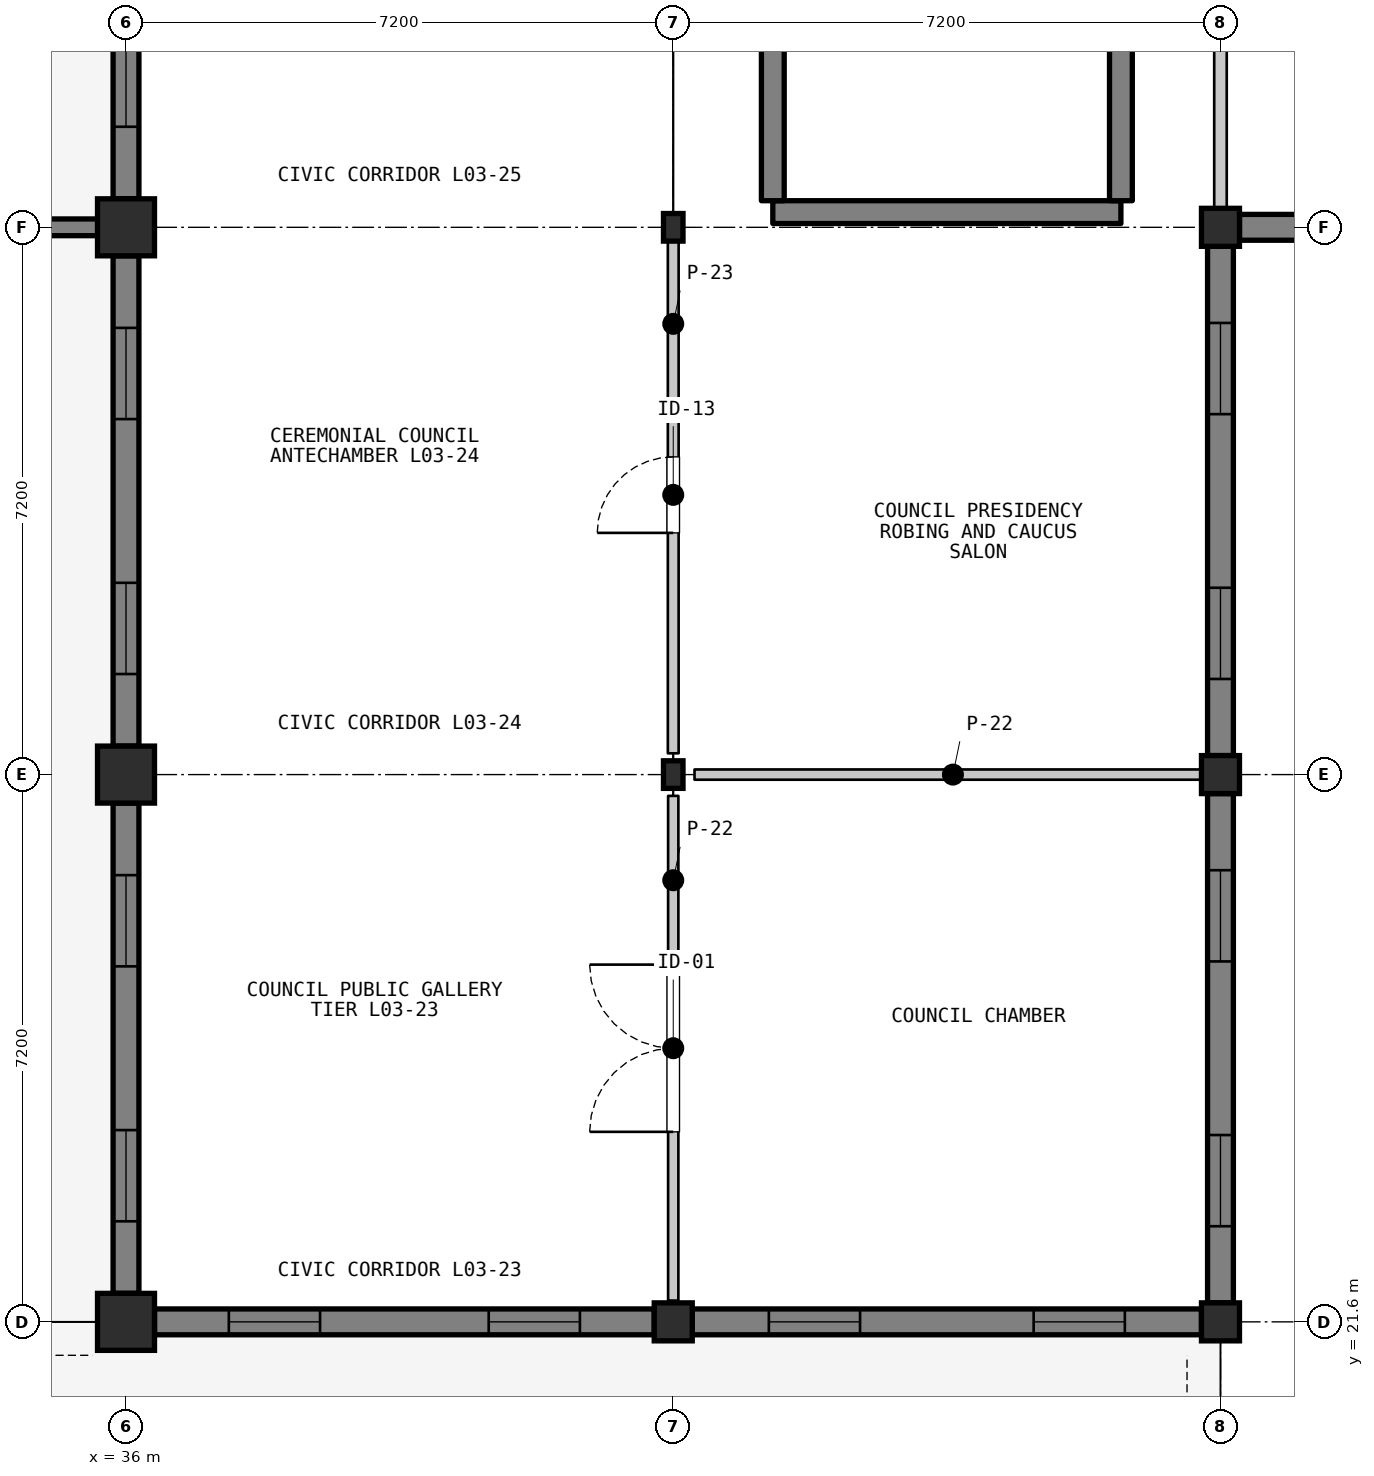
"""IFC4 building model, lengths in metres.
Left out: names, types, materials, properties, quantities, classifications, styles, units other than length and angle.
Written with IfcOpenShell. Run it as: python <this file> out.ifc"""

import sys

from ifc_helpers import new_model, si_unit, direction, frame, frame_2d, origin, origin_2d, place, context, subcontext, project, spatial, rectangle, i_section, extrude, element, fill, save


model = new_model("IFC4")
c1 = context("Model", 3, precision=1e-05, world=origin(), true_north=direction((0.0, 1.0)))
c2 = subcontext(c1, "Body", "Model", "MODEL_VIEW")
j1 = project(units=[si_unit("LENGTHUNIT", "METRE"), si_unit("PLANEANGLEUNIT", "RADIAN")], contexts=[c1])
p1 = place(None, origin())
s1 = spatial("IfcSite", under=j1, at=p1, CompositionType="ELEMENT")
p2 = place(p1, origin())
s2 = spatial("IfcBuilding", under=s1, at=p2, CompositionType="ELEMENT")
p3 = place(p2, frame((0.0, 0.0, 9.9)))
s3 = spatial("IfcBuildingStorey", under=s2, at=p3, CompositionType="ELEMENT", Elevation=9.9)
for number, where, z_axis, x_axis in (
    (1, (36.0, 21.6, 0.0), (0.0, 0.0, 1.0), (1.0, 0.0, 0.0)),
    (2, (36.0, 28.8, 0.0), (0.0, 0.0, 1.0), (1.0, 0.0, 0.0)),
    (3, (36.0, 36.0, 0.0), (0.0, 0.0, 1.0), (1.0, 0.0, 0.0)),
):
    element("IfcColumn", number, at=place(p3, frame(where, z_axis=z_axis, x_axis=x_axis)), inside=s3, PredefinedType="COLUMN", context=c2, shape_type="SweptSolid", body=[
        extrude(rectangle(XDim=0.75, YDim=0.75, at=origin_2d()), origin(), (0.0, 0.0, 1.0), 4.2),
    ])
p4 = place(p3, frame((43.2, 21.6, 0.0), z_axis=(0.0, 0.0, 1.0), x_axis=(1.0, 0.0, 0.0)))
e4 = element("IfcColumn", 4, at=p4, inside=s3, PredefinedType="COLUMN", context=c2, shape_type="SweptSolid", body=[
    extrude(rectangle(XDim=0.5, YDim=0.5, at=origin_2d()), origin(), (0.0, 0.0, 1.0), 4.2),
])
for number, where, z_axis, x_axis in (
    (5, (43.2, 28.8, 0.0), (0.0, 0.0, 1.0), (1.0, 0.0, 0.0)),
    (6, (43.2, 36.0, 0.0), (0.0, 0.0, 1.0), (1.0, 0.0, 0.0)),
):
    element("IfcColumn", number, at=place(p3, frame(where, z_axis=z_axis, x_axis=x_axis)), inside=s3, PredefinedType="COLUMN", context=c2, shape_type="SweptSolid", body=[
        extrude(i_section(OverallWidth=0.257, OverallDepth=0.363, WebThickness=0.013, FlangeThickness=0.022, FilletRadius=0.015, at=origin_2d()), origin(), (0.0, 0.0, 1.0), 4.2),
    ])
for number, where, z_axis, x_axis in (
    (7, (50.4, 21.6, 0.0), (0.0, 0.0, 1.0), (1.0, 0.0, 0.0)),
    (8, (50.4, 28.8, 0.0), (0.0, 0.0, 1.0), (1.0, 0.0, 0.0)),
    (9, (50.4, 36.0, 0.0), (0.0, 0.0, 1.0), (1.0, 0.0, 0.0)),
):
    element("IfcColumn", number, at=place(p3, frame(where, z_axis=z_axis, x_axis=x_axis)), inside=s3, PredefinedType="COLUMN", context=c2, shape_type="SweptSolid", body=[
        extrude(rectangle(XDim=0.5, YDim=0.5, at=origin_2d()), origin(), (0.0, 0.0, 1.0), 4.2),
    ])
p5 = place(p3, frame((42.95, 21.6, 0.0), z_axis=(0.0, 0.0, 1.0), x_axis=(-1.0, 0.0, 0.0)))
e10 = element("IfcWall", 10, at=p5, inside=s3, PredefinedType="SOLIDWALL", context=c2, shape_type="SweptSolid", body=[
    extrude(rectangle(XDim=6.575, YDim=0.34, at=frame_2d((3.288, 0.0))), origin(), (0.0, 0.0, 1.0), 3.398),
])
p6 = place(p5, frame((0.978, 0.0, 0.95)))
e11 = element("IfcOpeningElement", 11, at=p6, cuts=e10, PredefinedType="OPENING", context=c2, shape_type="SweptSolid", body=[
    extrude(rectangle(XDim=1.2, YDim=1.7, at=frame_2d((0.6, 0.85))), frame((0.0, 0.18, 0.0), z_axis=(0.0, -1.0, 0.0), x_axis=(1.0, 0.0, 0.0)), (0.0, 0.0, 1.0), 0.36),
])
p7 = place(p5, frame((4.397, 0.0, 0.95)))
e12 = element("IfcOpeningElement", 12, at=p7, cuts=e10, PredefinedType="OPENING", context=c2, shape_type="SweptSolid", body=[
    extrude(rectangle(XDim=1.2, YDim=1.7, at=frame_2d((0.6, 0.85))), frame((0.0, 0.18, 0.0), z_axis=(0.0, -1.0, 0.0), x_axis=(1.0, 0.0, 0.0)), (0.0, 0.0, 1.0), 0.36),
])
p8 = place(p3, frame((36.0, 21.975, 0.0), z_axis=(0.0, 0.0, 1.0), x_axis=(0.0, 1.0, 0.0)))
e13 = element("IfcWall", 13, at=p8, inside=s3, PredefinedType="SOLIDWALL", context=c2, shape_type="SweptSolid", body=[
    extrude(rectangle(XDim=6.45, YDim=0.34, at=frame_2d((3.225, 0.0))), origin(), (0.0, 0.0, 1.0), 3.35),
])
p9 = place(p8, frame((0.948, 0.0, 0.95)))
e14 = element("IfcOpeningElement", 14, at=p9, cuts=e13, PredefinedType="OPENING", context=c2, shape_type="SweptSolid", body=[
    extrude(rectangle(XDim=1.2, YDim=1.7, at=frame_2d((0.6, 0.85))), frame((0.0, 0.18, 0.0), z_axis=(0.0, -1.0, 0.0), x_axis=(1.0, 0.0, 0.0)), (0.0, 0.0, 1.0), 0.36),
])
p10 = place(p8, frame((4.302, 0.0, 0.95)))
e15 = element("IfcOpeningElement", 15, at=p10, cuts=e13, PredefinedType="OPENING", context=c2, shape_type="SweptSolid", body=[
    extrude(rectangle(XDim=1.2, YDim=1.7, at=frame_2d((0.6, 0.85))), frame((0.0, 0.18, 0.0), z_axis=(0.0, -1.0, 0.0), x_axis=(1.0, 0.0, 0.0)), (0.0, 0.0, 1.0), 0.36),
])
p11 = place(p3, frame((36.0, 29.175, 0.0), z_axis=(0.0, 0.0, 1.0), x_axis=(0.0, 1.0, 0.0)))
e16 = element("IfcWall", 16, at=p11, inside=s3, PredefinedType="SOLIDWALL", context=c2, shape_type="SweptSolid", body=[
    extrude(rectangle(XDim=6.45, YDim=0.34, at=frame_2d((3.225, 0.0))), origin(), (0.0, 0.0, 1.0), 3.35),
])
p12 = place(p11, frame((0.948, 0.0, 0.95)))
e17 = element("IfcOpeningElement", 17, at=p12, cuts=e16, PredefinedType="OPENING", context=c2, shape_type="SweptSolid", body=[
    extrude(rectangle(XDim=1.2, YDim=1.7, at=frame_2d((0.6, 0.85))), frame((0.0, 0.18, 0.0), z_axis=(0.0, -1.0, 0.0), x_axis=(1.0, 0.0, 0.0)), (0.0, 0.0, 1.0), 0.36),
])
p13 = place(p11, frame((4.302, 0.0, 0.95)))
e18 = element("IfcOpeningElement", 18, at=p13, cuts=e16, PredefinedType="OPENING", context=c2, shape_type="SweptSolid", body=[
    extrude(rectangle(XDim=1.2, YDim=1.7, at=frame_2d((0.6, 0.85))), frame((0.0, 0.18, 0.0), z_axis=(0.0, -1.0, 0.0), x_axis=(1.0, 0.0, 0.0)), (0.0, 0.0, 1.0), 0.36),
])
p14 = place(p3, frame((36.0, 36.375, 0.0), z_axis=(0.0, 0.0, 1.0), x_axis=(0.0, 1.0, 0.0)))
e19 = element("IfcWall", 19, at=p14, inside=s3, PredefinedType="SOLIDWALL", context=c2, shape_type="SweptSolid", body=[
    extrude(rectangle(XDim=6.45, YDim=0.34, at=frame_2d((3.225, 0.0))), origin(), (0.0, 0.0, 1.0), 3.35),
])
p15 = place(p14, frame((0.948, 0.0, 0.95)))
e20 = element("IfcOpeningElement", 20, at=p15, cuts=e19, PredefinedType="OPENING", context=c2, shape_type="SweptSolid", body=[
    extrude(rectangle(XDim=1.2, YDim=1.7, at=frame_2d((0.6, 0.85))), frame((0.0, 0.18, 0.0), z_axis=(0.0, -1.0, 0.0), x_axis=(1.0, 0.0, 0.0)), (0.0, 0.0, 1.0), 0.36),
])
p16 = place(p14, frame((4.302, 0.0, 0.95)))
e21 = element("IfcOpeningElement", 21, at=p16, cuts=e19, PredefinedType="OPENING", context=c2, shape_type="SweptSolid", body=[
    extrude(rectangle(XDim=1.2, YDim=1.7, at=frame_2d((0.6, 0.85))), frame((0.0, 0.18, 0.0), z_axis=(0.0, -1.0, 0.0), x_axis=(1.0, 0.0, 0.0)), (0.0, 0.0, 1.0), 0.36),
])
p17 = place(p3, frame((50.15, 21.6, 0.0), z_axis=(0.0, 0.0, 1.0), x_axis=(-1.0, 0.0, 0.0)))
e22 = element("IfcWall", 22, at=p17, inside=s3, PredefinedType="SOLIDWALL", context=c2, shape_type="SweptSolid", body=[
    extrude(rectangle(XDim=6.7, YDim=0.34, at=frame_2d((3.35, 0.0))), origin(), (0.0, 0.0, 1.0), 3.398),
])
p18 = place(p17, frame((1.008, 0.0, 0.95)))
e23 = element("IfcOpeningElement", 23, at=p18, cuts=e22, PredefinedType="OPENING", context=c2, shape_type="SweptSolid", body=[
    extrude(rectangle(XDim=1.2, YDim=1.7, at=frame_2d((0.6, 0.85))), frame((0.0, 0.18, 0.0), z_axis=(0.0, -1.0, 0.0), x_axis=(1.0, 0.0, 0.0)), (0.0, 0.0, 1.0), 0.36),
])
p19 = place(p17, frame((4.492, 0.0, 0.95)))
e24 = element("IfcOpeningElement", 24, at=p19, cuts=e22, PredefinedType="OPENING", context=c2, shape_type="SweptSolid", body=[
    extrude(rectangle(XDim=1.2, YDim=1.7, at=frame_2d((0.6, 0.85))), frame((0.0, 0.18, 0.0), z_axis=(0.0, -1.0, 0.0), x_axis=(1.0, 0.0, 0.0)), (0.0, 0.0, 1.0), 0.36),
])
p20 = place(p3, frame((50.4, 28.55, 0.0), z_axis=(0.0, 0.0, 1.0), x_axis=(0.0, -1.0, 0.0)))
e25 = element("IfcWall", 25, at=p20, inside=s3, PredefinedType="SOLIDWALL", context=c2, shape_type="SweptSolid", body=[
    extrude(rectangle(XDim=6.7, YDim=0.34, at=frame_2d((3.35, 0.0))), origin(), (0.0, 0.0, 1.0), 3.467),
])
p21 = place(p20, frame((1.008, 0.0, 0.95)))
e26 = element("IfcOpeningElement", 26, at=p21, cuts=e25, PredefinedType="OPENING", context=c2, shape_type="SweptSolid", body=[
    extrude(rectangle(XDim=1.2, YDim=1.7, at=frame_2d((0.6, 0.85))), frame((0.0, 0.18, 0.0), z_axis=(0.0, -1.0, 0.0), x_axis=(1.0, 0.0, 0.0)), (0.0, 0.0, 1.0), 0.36),
])
p22 = place(p20, frame((4.492, 0.0, 0.95)))
e27 = element("IfcOpeningElement", 27, at=p22, cuts=e25, PredefinedType="OPENING", context=c2, shape_type="SweptSolid", body=[
    extrude(rectangle(XDim=1.2, YDim=1.7, at=frame_2d((0.6, 0.85))), frame((0.0, 0.18, 0.0), z_axis=(0.0, -1.0, 0.0), x_axis=(1.0, 0.0, 0.0)), (0.0, 0.0, 1.0), 0.36),
])
p23 = place(p3, frame((50.4, 35.75, 0.0), z_axis=(0.0, 0.0, 1.0), x_axis=(0.0, -1.0, 0.0)))
e28 = element("IfcWall", 28, at=p23, inside=s3, PredefinedType="SOLIDWALL", context=c2, shape_type="SweptSolid", body=[
    extrude(rectangle(XDim=6.7, YDim=0.34, at=frame_2d((3.35, 0.0))), origin(), (0.0, 0.0, 1.0), 3.467),
])
p24 = place(p23, frame((1.008, 0.0, 0.95)))
e29 = element("IfcOpeningElement", 29, at=p24, cuts=e28, PredefinedType="OPENING", context=c2, shape_type="SweptSolid", body=[
    extrude(rectangle(XDim=1.2, YDim=1.7, at=frame_2d((0.6, 0.85))), frame((0.0, 0.18, 0.0), z_axis=(0.0, -1.0, 0.0), x_axis=(1.0, 0.0, 0.0)), (0.0, 0.0, 1.0), 0.36),
])
p25 = place(p23, frame((4.492, 0.0, 0.95)))
e30 = element("IfcOpeningElement", 30, at=p25, cuts=e28, PredefinedType="OPENING", context=c2, shape_type="SweptSolid", body=[
    extrude(rectangle(XDim=1.2, YDim=1.7, at=frame_2d((0.6, 0.85))), frame((0.0, 0.18, 0.0), z_axis=(0.0, -1.0, 0.0), x_axis=(1.0, 0.0, 0.0)), (0.0, 0.0, 1.0), 0.36),
])
p26 = place(p3, frame((57.35, 36.0, 0.0), z_axis=(0.0, 0.0, 1.0), x_axis=(-1.0, 0.0, 0.0)))
e31 = element("IfcWall", 31, at=p26, inside=s3, PredefinedType="SOLIDWALL", context=c2, shape_type="SweptSolid", body=[
    extrude(rectangle(XDim=6.7, YDim=0.34, at=frame_2d((3.35, 0.0))), origin(), (0.0, 0.0, 1.0), 3.398),
])
p27 = place(p26, frame((1.008, 0.0, 0.95)))
e32 = element("IfcOpeningElement", 32, at=p27, cuts=e31, PredefinedType="OPENING", context=c2, shape_type="SweptSolid", body=[
    extrude(rectangle(XDim=1.2, YDim=1.7, at=frame_2d((0.6, 0.85))), frame((0.0, 0.18, 0.0), z_axis=(0.0, -1.0, 0.0), x_axis=(1.0, 0.0, 0.0)), (0.0, 0.0, 1.0), 0.36),
])
p28 = place(p26, frame((4.492, 0.0, 0.95)))
e33 = element("IfcOpeningElement", 33, at=p28, cuts=e31, PredefinedType="OPENING", context=c2, shape_type="SweptSolid", body=[
    extrude(rectangle(XDim=1.2, YDim=1.7, at=frame_2d((0.6, 0.85))), frame((0.0, 0.18, 0.0), z_axis=(0.0, -1.0, 0.0), x_axis=(1.0, 0.0, 0.0)), (0.0, 0.0, 1.0), 0.36),
])
p29 = place(p3, frame((35.85, 36.0, 0.0), z_axis=(0.0, 0.0, 1.0), x_axis=(-1.0, 0.0, 0.0)))
e34 = element("IfcWall", 34, at=p29, inside=s3, PredefinedType="PARAPET", context=c2, shape_type="SweptSolid", body=[
    extrude(rectangle(XDim=6.9, YDim=0.22, at=frame_2d((3.45, 0.0))), origin(), (0.0, 0.0, 1.0), 0.85),
])
p30 = place(p3, frame((44.51, 36.2, 0.0), z_axis=(0.0, 0.0, 1.0), x_axis=(1.0, 0.0, 0.0)))
e35 = element("IfcWall", 35, at=p30, inside=s3, PredefinedType="SHEAR", context=c2, shape_type="SweptSolid", body=[
    extrude(rectangle(XDim=4.58, YDim=0.3, at=frame_2d((2.29, 0.0))), origin(), (0.0, 0.0, 1.0), 4.02),
])
for number, where, z_axis, x_axis in (
    (36, (44.51, 36.35, 0.0), (0.0, 0.0, 1.0), (0.0, 1.0, 0.0)),
    (37, (49.09, 36.35, 0.0), (0.0, 0.0, 1.0), (0.0, 1.0, 0.0)),
):
    element("IfcWall", number, at=place(p3, frame(where, z_axis=z_axis, x_axis=x_axis)), inside=s3, PredefinedType="SHEAR", context=c2, shape_type="SweptSolid", body=[
        extrude(rectangle(XDim=9.3, YDim=0.3, at=frame_2d((4.65, 0.0))), origin(), (0.0, 0.0, 1.0), 4.02),
    ])
p31 = place(p3, frame((43.2, 21.88, 0.0), z_axis=(0.0, 0.0, 1.0), x_axis=(0.0, 1.0, 0.0)))
e38 = element("IfcWall", 38, at=p31, inside=s3, PredefinedType="PARTITIONING", context=c2, shape_type="SweptSolid", body=[
    extrude(rectangle(XDim=6.64, YDim=0.135, at=frame_2d((3.32, 0.0))), origin(), (0.0, 0.0, 1.0), 3.457),
])
p32 = place(p31, frame((2.22, 0.0, 0.0)))
e39 = element("IfcOpeningElement", 39, at=p32, cuts=e38, PredefinedType="OPENING", context=c2, shape_type="SweptSolid", body=[
    extrude(rectangle(XDim=2.2, YDim=2.6, at=frame_2d((1.1, 1.3))), frame((0.0, 0.077, 0.0), z_axis=(0.0, -1.0, 0.0), x_axis=(1.0, 0.0, 0.0)), (0.0, 0.0, 1.0), 0.155),
])
p33 = place(p3, frame((43.48, 28.8, 0.0), z_axis=(0.0, 0.0, 1.0), x_axis=(1.0, 0.0, 0.0)))
e40 = element("IfcWall", 40, at=p33, inside=s3, PredefinedType="PARTITIONING", context=c2, shape_type="SweptSolid", body=[
    extrude(rectangle(XDim=6.8, YDim=0.135, at=frame_2d((3.4, 0.0))), origin(), (0.0, 0.0, 1.0), 3.388),
])
p34 = place(p3, frame((43.2, 29.08, 0.0), z_axis=(0.0, 0.0, 1.0), x_axis=(0.0, 1.0, 0.0)))
e41 = element("IfcWall", 41, at=p34, inside=s3, PredefinedType="PARTITIONING", context=c2, shape_type="SweptSolid", body=[
    extrude(rectangle(XDim=6.8, YDim=0.142, at=frame_2d((3.4, 0.0))), origin(), (0.0, 0.0, 1.0), 3.388),
])
p35 = place(p34, frame((2.9, 0.0, 0.0)))
e42 = element("IfcOpeningElement", 42, at=p35, cuts=e41, PredefinedType="OPENING", context=c2, shape_type="SweptSolid", body=[
    extrude(rectangle(XDim=1.0, YDim=2.15, at=frame_2d((0.5, 1.075))), frame((0.0, 0.081, 0.0), z_axis=(0.0, -1.0, 0.0), x_axis=(1.0, 0.0, 0.0)), (0.0, 0.0, 1.0), 0.162),
])
p36 = place(p3, frame((50.4, 36.12, 0.0), z_axis=(0.0, 0.0, 1.0), x_axis=(0.0, 1.0, 0.0)))
e43 = element("IfcWall", 43, at=p36, inside=s3, PredefinedType="PARTITIONING", context=c2, shape_type="SweptSolid", body=[
    extrude(rectangle(XDim=6.96, YDim=0.165, at=frame_2d((3.48, 0.0))), origin(), (0.0, 0.0, 1.0), 3.388),
])
p37 = place(p6, origin())
e44 = element("IfcWindow", 44, at=p37, inside=s3, PartitioningType="SINGLE_PANEL", PredefinedType="WINDOW", context=c2, shape_type="SweptSolid", body=[
    extrude(rectangle(XDim=1.2, YDim=1.7, at=frame_2d((0.6, 0.85))), frame((0.0, 0.03, 0.0), z_axis=(0.0, -1.0, 0.0), x_axis=(1.0, 0.0, 0.0)), (0.0, 0.0, 1.0), 0.06),
])
fill(e11, e44)
p38 = place(p7, origin())
e45 = element("IfcWindow", 45, at=p38, inside=s3, PartitioningType="SINGLE_PANEL", PredefinedType="WINDOW", context=c2, shape_type="SweptSolid", body=[
    extrude(rectangle(XDim=1.2, YDim=1.7, at=frame_2d((0.6, 0.85))), frame((0.0, 0.03, 0.0), z_axis=(0.0, -1.0, 0.0), x_axis=(1.0, 0.0, 0.0)), (0.0, 0.0, 1.0), 0.06),
])
fill(e12, e45)
p39 = place(p9, origin())
e46 = element("IfcWindow", 46, at=p39, inside=s3, PartitioningType="SINGLE_PANEL", PredefinedType="WINDOW", context=c2, shape_type="SweptSolid", body=[
    extrude(rectangle(XDim=1.2, YDim=1.7, at=frame_2d((0.6, 0.85))), frame((0.0, 0.03, 0.0), z_axis=(0.0, -1.0, 0.0), x_axis=(1.0, 0.0, 0.0)), (0.0, 0.0, 1.0), 0.06),
])
fill(e14, e46)
p40 = place(p10, origin())
e47 = element("IfcWindow", 47, at=p40, inside=s3, PartitioningType="SINGLE_PANEL", PredefinedType="WINDOW", context=c2, shape_type="SweptSolid", body=[
    extrude(rectangle(XDim=1.2, YDim=1.7, at=frame_2d((0.6, 0.85))), frame((0.0, 0.03, 0.0), z_axis=(0.0, -1.0, 0.0), x_axis=(1.0, 0.0, 0.0)), (0.0, 0.0, 1.0), 0.06),
])
fill(e15, e47)
p41 = place(p12, origin())
e48 = element("IfcWindow", 48, at=p41, inside=s3, PartitioningType="SINGLE_PANEL", PredefinedType="WINDOW", context=c2, shape_type="SweptSolid", body=[
    extrude(rectangle(XDim=1.2, YDim=1.7, at=frame_2d((0.6, 0.85))), frame((0.0, 0.03, 0.0), z_axis=(0.0, -1.0, 0.0), x_axis=(1.0, 0.0, 0.0)), (0.0, 0.0, 1.0), 0.06),
])
fill(e17, e48)
p42 = place(p13, origin())
e49 = element("IfcWindow", 49, at=p42, inside=s3, PartitioningType="SINGLE_PANEL", PredefinedType="WINDOW", context=c2, shape_type="SweptSolid", body=[
    extrude(rectangle(XDim=1.2, YDim=1.7, at=frame_2d((0.6, 0.85))), frame((0.0, 0.03, 0.0), z_axis=(0.0, -1.0, 0.0), x_axis=(1.0, 0.0, 0.0)), (0.0, 0.0, 1.0), 0.06),
])
fill(e18, e49)
p43 = place(p15, origin())
e50 = element("IfcWindow", 50, at=p43, inside=s3, PartitioningType="SINGLE_PANEL", PredefinedType="WINDOW", context=c2, shape_type="SweptSolid", body=[
    extrude(rectangle(XDim=1.2, YDim=1.7, at=frame_2d((0.6, 0.85))), frame((0.0, 0.03, 0.0), z_axis=(0.0, -1.0, 0.0), x_axis=(1.0, 0.0, 0.0)), (0.0, 0.0, 1.0), 0.06),
])
fill(e20, e50)
p44 = place(p18, origin())
e51 = element("IfcWindow", 51, at=p44, inside=s3, PartitioningType="SINGLE_PANEL", PredefinedType="WINDOW", context=c2, shape_type="SweptSolid", body=[
    extrude(rectangle(XDim=1.2, YDim=1.7, at=frame_2d((0.6, 0.85))), frame((0.0, 0.03, 0.0), z_axis=(0.0, -1.0, 0.0), x_axis=(1.0, 0.0, 0.0)), (0.0, 0.0, 1.0), 0.06),
])
fill(e23, e51)
p45 = place(p19, origin())
e52 = element("IfcWindow", 52, at=p45, inside=s3, PartitioningType="SINGLE_PANEL", PredefinedType="WINDOW", context=c2, shape_type="SweptSolid", body=[
    extrude(rectangle(XDim=1.2, YDim=1.7, at=frame_2d((0.6, 0.85))), frame((0.0, 0.03, 0.0), z_axis=(0.0, -1.0, 0.0), x_axis=(1.0, 0.0, 0.0)), (0.0, 0.0, 1.0), 0.06),
])
fill(e24, e52)
p46 = place(p21, origin())
e53 = element("IfcWindow", 53, at=p46, inside=s3, PartitioningType="SINGLE_PANEL", PredefinedType="WINDOW", context=c2, shape_type="SweptSolid", body=[
    extrude(rectangle(XDim=1.2, YDim=1.7, at=frame_2d((0.6, 0.85))), frame((0.0, 0.03, 0.0), z_axis=(0.0, -1.0, 0.0), x_axis=(1.0, 0.0, 0.0)), (0.0, 0.0, 1.0), 0.06),
])
fill(e26, e53)
p47 = place(p22, origin())
e54 = element("IfcWindow", 54, at=p47, inside=s3, PartitioningType="SINGLE_PANEL", PredefinedType="WINDOW", context=c2, shape_type="SweptSolid", body=[
    extrude(rectangle(XDim=1.2, YDim=1.7, at=frame_2d((0.6, 0.85))), frame((0.0, 0.03, 0.0), z_axis=(0.0, -1.0, 0.0), x_axis=(1.0, 0.0, 0.0)), (0.0, 0.0, 1.0), 0.06),
])
fill(e27, e54)
p48 = place(p24, origin())
e55 = element("IfcWindow", 55, at=p48, inside=s3, PartitioningType="SINGLE_PANEL", PredefinedType="WINDOW", context=c2, shape_type="SweptSolid", body=[
    extrude(rectangle(XDim=1.2, YDim=1.7, at=frame_2d((0.6, 0.85))), frame((0.0, 0.03, 0.0), z_axis=(0.0, -1.0, 0.0), x_axis=(1.0, 0.0, 0.0)), (0.0, 0.0, 1.0), 0.06),
])
fill(e29, e55)
p49 = place(p25, origin())
e56 = element("IfcWindow", 56, at=p49, inside=s3, PartitioningType="SINGLE_PANEL", PredefinedType="WINDOW", context=c2, shape_type="SweptSolid", body=[
    extrude(rectangle(XDim=1.2, YDim=1.7, at=frame_2d((0.6, 0.85))), frame((0.0, 0.03, 0.0), z_axis=(0.0, -1.0, 0.0), x_axis=(1.0, 0.0, 0.0)), (0.0, 0.0, 1.0), 0.06),
])
fill(e30, e56)
p50 = place(p32, origin())
e57 = element("IfcDoor", 57, at=p50, inside=s3, OperationType="DOUBLE_DOOR_SINGLE_SWING", PredefinedType="DOOR", context=c2, shape_type="SweptSolid", body=[
    extrude(rectangle(XDim=2.2, YDim=2.6, at=frame_2d((1.1, 1.3))), frame((0.0, 0.025, 0.0), z_axis=(0.0, -1.0, 0.0), x_axis=(1.0, 0.0, 0.0)), (0.0, 0.0, 1.0), 0.05),
])
fill(e39, e57)
p51 = place(p35, origin())
e58 = element("IfcDoor", 58, at=p51, inside=s3, OperationType="SINGLE_SWING_LEFT", PredefinedType="DOOR", context=c2, shape_type="SweptSolid", body=[
    extrude(rectangle(XDim=1.0, YDim=2.15, at=frame_2d((0.5, 1.075))), frame((0.0, 0.025, 0.0), z_axis=(0.0, -1.0, 0.0), x_axis=(1.0, 0.0, 0.0)), (0.0, 0.0, 1.0), 0.05),
])
fill(e42, e58)
save(model, sys.argv[1])
